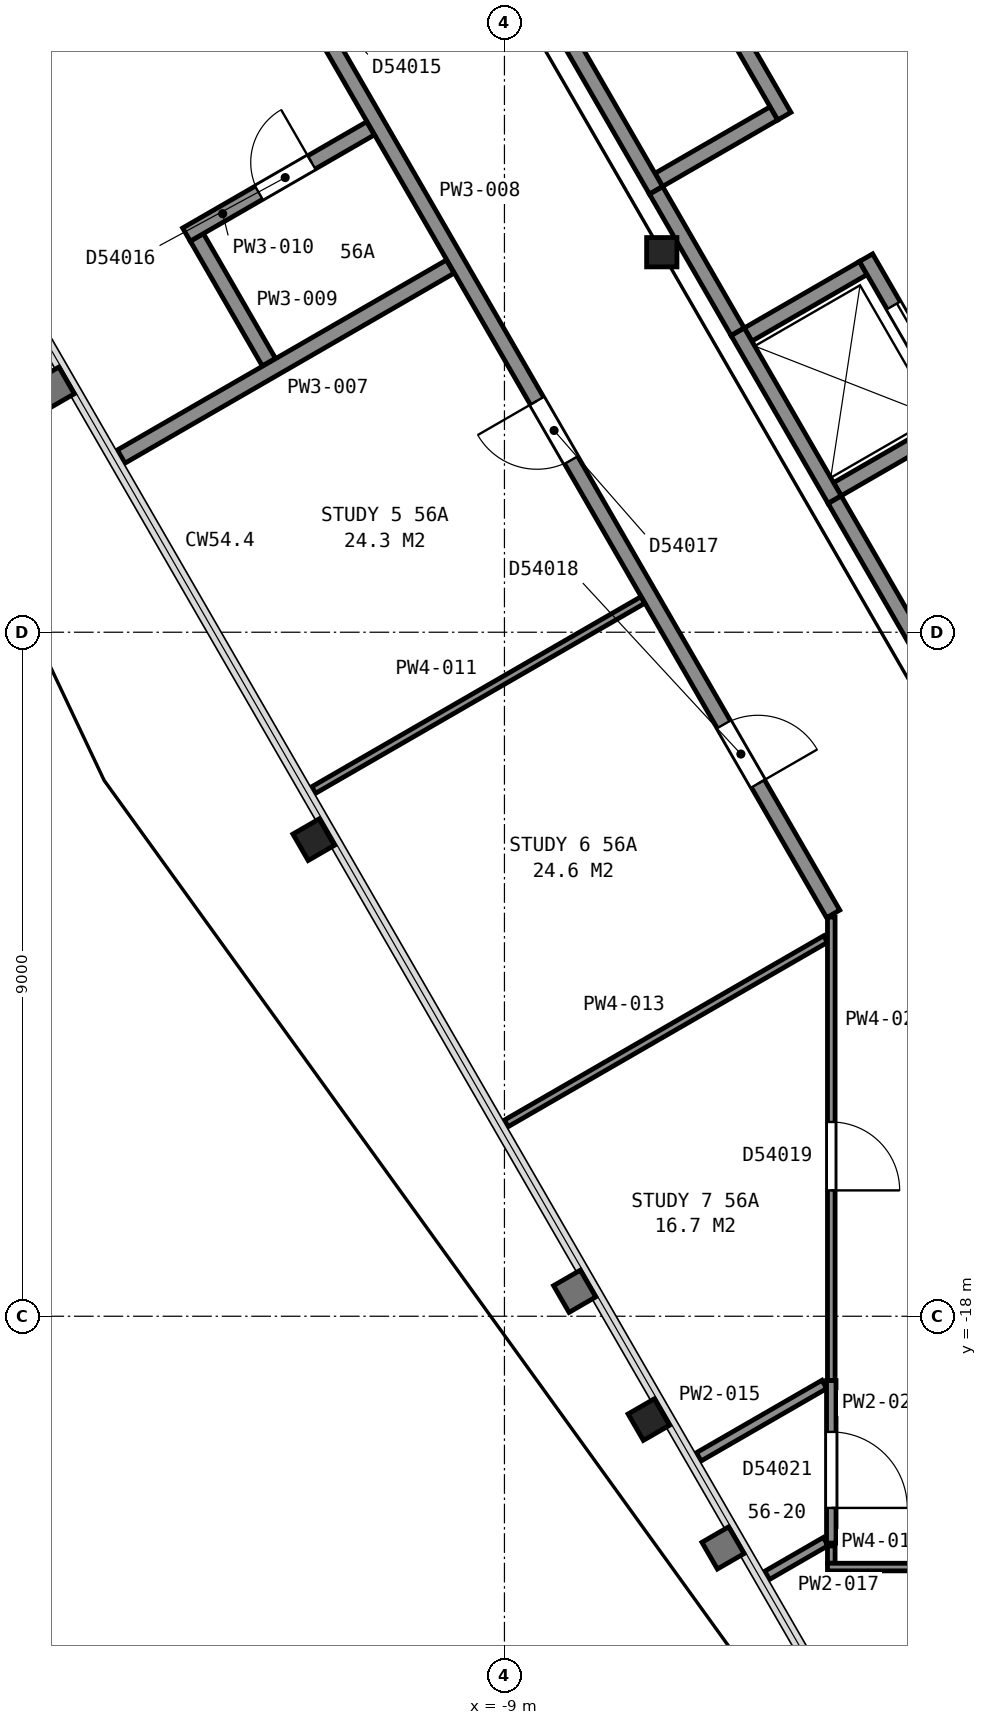
"""IFC4 building model, lengths in metres.
Left out: names, types, materials, properties, quantities, classifications, styles, units other than length and angle.
Written with IfcOpenShell. Run it as: python <this file> out.ifc"""

import sys

from ifc_helpers import new_model, si_unit, direction, frame, frame_2d, origin, origin_2d, place, context, subcontext, project, spatial, rectangle, i_section, extrude, element, fill, save


model = new_model("IFC4")
c1 = context("Model", 3, precision=1e-05, world=origin(), true_north=direction((0.0, 1.0)))
c2 = subcontext(c1, "Body", "Model", "MODEL_VIEW")
j1 = project(units=[si_unit("LENGTHUNIT", "METRE"), si_unit("PLANEANGLEUNIT", "RADIAN")], contexts=[c1])
p1 = place(None, origin())
s1 = spatial("IfcSite", under=j1, at=p1, CompositionType="ELEMENT")
p2 = place(p1, origin())
s2 = spatial("IfcBuilding", under=s1, at=p2, CompositionType="ELEMENT")
p3 = place(p2, frame((0.0, 0.0, 224.9)))
s3 = spatial("IfcBuildingStorey", under=s2, at=p3, CompositionType="ELEMENT", Elevation=224.9)
for number, where, z_axis, x_axis in (
    (1, (-11.51, -11.73, 0.0), (0.0, 0.0, 1.0), (-0.5, 0.866, 0.0)),
    (2, (-7.1, -19.36, 0.0), (0.0, 0.0, 1.0), (-0.5, 0.866, 0.0)),
):
    element("IfcColumn", number, at=place(p3, frame(where, z_axis=z_axis, x_axis=x_axis)), inside=s3, PredefinedType="COLUMN", context=c2, shape_type="SweptSolid", body=[
        extrude(i_section(OverallWidth=0.401, OverallDepth=0.399, WebThickness=0.025, FlangeThickness=0.04, FilletRadius=0.015, at=origin_2d()), origin(), (0.0, 0.0, 1.0), 3.7),
    ])
p4 = place(p3, frame((-6.93, -4.0, 0.0), z_axis=(0.0, 0.0, 1.0), x_axis=(1.0, 0.0, 0.0)))
e3 = element("IfcColumn", 3, at=p4, inside=s3, PredefinedType="COLUMN", context=c2, shape_type="SweptSolid", body=[
    extrude(i_section(OverallWidth=0.399, OverallDepth=0.386, WebThickness=0.021, FlangeThickness=0.033, FilletRadius=0.015, at=origin_2d()), origin(), (0.0, 0.0, 1.0), 3.7),
])
for number, where, z_axis, x_axis in (
    (4, (-4.62, -7.118, 0.0), (0.0, 0.0, 1.0), (0.866, 0.5, 0.0)),
    (5, (-5.795, -5.083, 0.0), (0.0, 0.0, 1.0), (0.866, 0.5, 0.0)),
    (6, (-6.97, -3.048, 0.0), (0.0, 0.0, 1.0), (0.866, 0.5, 0.0)),
):
    element("IfcWall", number, at=place(p3, frame(where, z_axis=z_axis, x_axis=x_axis)), inside=s3, PredefinedType="PARTITIONING", context=c2, shape_type="SweptSolid", body=[
        extrude(rectangle(XDim=1.75, YDim=0.2, at=frame_2d((0.875, 0.0))), origin(), (0.0, 0.0, 1.0), 3.7),
    ])
p5 = place(p3, frame((-2.968, -6.28, 0.0), z_axis=(0.0, 0.0, 1.0), x_axis=(-0.499990435942, 0.866030925526, 0.0)))
e7 = element("IfcWall", 7, at=p5, inside=s3, PredefinedType="PARTITIONING", context=c2, shape_type="SweptSolid", body=[
    extrude(rectangle(XDim=2.55, YDim=0.2, at=frame_2d((1.275, 0.0))), origin(), (0.0, 0.0, 1.0), 3.7),
])
p6 = place(p5, frame((0.725, 0.0, 0.0)))
e8 = element("IfcOpeningElement", 8, at=p6, cuts=e7, PredefinedType="OPENING", context=c2, shape_type="SweptSolid", body=[
    extrude(rectangle(XDim=1.1, YDim=2.1, at=frame_2d((0.55, 1.05))), frame((0.0, 0.11, 0.0), z_axis=(0.0, -1.0, 0.0), x_axis=(1.0, 0.0, 0.0)), (0.0, 0.0, 1.0), 0.22),
])
p7 = place(p3, frame((-5.318, -2.21, 0.0), z_axis=(0.0, 0.0, 1.0), x_axis=(-0.499938297808, 0.866061024631, 0.0)))
e9 = element("IfcWall", 9, at=p7, inside=s3, PredefinedType="PARTITIONING", context=c2, shape_type="SweptSolid", body=[
    extrude(rectangle(XDim=2.35, YDim=0.2, at=frame_2d((1.175, 0.0))), origin(), (0.0, 0.0, 1.0), 3.7),
])
for number, where, z_axis, x_axis in (
    (10, (-4.656, -7.255, 0.0), (0.0, 0.0, 1.0), (-0.5, 0.866, 0.0)),
    (11, (-7.006, -3.185, 0.0), (0.0, 0.0, 1.0), (-0.5, 0.866, 0.0)),
):
    element("IfcWall", number, at=place(p3, frame(where, z_axis=z_axis, x_axis=x_axis)), inside=s3, PredefinedType="PARTITIONING", context=c2, shape_type="SweptSolid", body=[
        extrude(rectangle(XDim=2.55, YDim=0.2, at=frame_2d((1.275, 0.0))), origin(), (0.0, 0.0, 1.0), 3.7),
    ])
p8 = place(p3, frame((-7.005, -3.187, 0.0), z_axis=(0.0, 0.0, 1.0), x_axis=(0.499689606989, -0.866204535123, 0.0)))
e12 = element("IfcWall", 12, at=p8, inside=s3, PredefinedType="PARTITIONING", context=c2, shape_type="SweptSolid", body=[
    extrude(rectangle(XDim=2.145, YDim=0.2, at=frame_2d((1.072, 0.0))), origin(), (0.0, 0.0, 1.0), 3.45),
])
p9 = place(p3, frame((-4.655, -7.257, 0.0), z_axis=(0.0, 0.0, 1.0), x_axis=(0.499966124405, -0.866044960985, 0.0)))
e13 = element("IfcWall", 13, at=p9, inside=s3, PredefinedType="PARTITIONING", context=c2, shape_type="SweptSolid", body=[
    extrude(rectangle(XDim=5.956, YDim=0.2, at=frame_2d((2.978, 0.0))), origin(), (0.0, 0.0, 1.0), 3.45),
])
p10 = place(p3, frame((-14.043, -6.689, 0.0), z_axis=(0.0, 0.0, 1.0), x_axis=(0.866053039883, 0.499952129818, 0.0)))
e14 = element("IfcWall", 14, at=p10, inside=s3, PredefinedType="PARTITIONING", context=c2, shape_type="SweptSolid", body=[
    extrude(rectangle(XDim=5.0, YDim=0.2, at=frame_2d((2.5, 0.0))), origin(), (0.0, 0.0, 1.0), 2.713),
])
p11 = place(p3, frame((-4.675, -12.706, 0.0), z_axis=(0.0, 0.0, 1.0), x_axis=(-0.49997440863, 0.866040178465, 0.0)))
e15 = element("IfcWall", 15, at=p11, inside=s3, PredefinedType="PARTITIONING", context=c2, shape_type="SweptSolid", body=[
    extrude(rectangle(XDim=17.335, YDim=0.2, at=frame_2d((8.667, 0.0))), origin(), (0.0, 0.0, 1.0), 2.713),
])
p12 = place(p11, frame((14.185, 0.0, 0.0)))
e16 = element("IfcOpeningElement", 16, at=p12, cuts=e15, PredefinedType="OPENING", context=c2, shape_type="SweptSolid", body=[
    extrude(rectangle(XDim=0.9, YDim=2.1, at=frame_2d((0.45, 1.05))), frame((0.0, 0.11, 0.0), z_axis=(0.0, -1.0, 0.0), x_axis=(1.0, 0.0, 0.0)), (0.0, 0.0, 1.0), 0.22),
])
p13 = place(p11, frame((6.895, 0.0, 0.0)))
e17 = element("IfcOpeningElement", 17, at=p13, cuts=e15, PredefinedType="OPENING", context=c2, shape_type="SweptSolid", body=[
    extrude(rectangle(XDim=0.9, YDim=2.1, at=frame_2d((0.45, 1.05))), frame((0.0, 0.11, 0.0), z_axis=(0.0, -1.0, 0.0), x_axis=(1.0, 0.0, 0.0)), (0.0, 0.0, 1.0), 0.22),
])
p14 = place(p11, frame((1.979, 0.0, 0.0)))
e18 = element("IfcOpeningElement", 18, at=p14, cuts=e15, PredefinedType="OPENING", context=c2, shape_type="SweptSolid", body=[
    extrude(rectangle(XDim=0.9, YDim=2.1, at=frame_2d((0.45, 1.05))), frame((0.0, 0.11, 0.0), z_axis=(0.0, -1.0, 0.0), x_axis=(1.0, 0.0, 0.0)), (0.0, 0.0, 1.0), 0.22),
])
p15 = place(p3, frame((-13.047, -3.805, 0.0), z_axis=(0.0, 0.0, 1.0), x_axis=(0.499949193323, -0.866054735046, 0.0)))
e19 = element("IfcWall", 19, at=p15, inside=s3, PredefinedType="PARTITIONING", context=c2, shape_type="SweptSolid", body=[
    extrude(rectangle(XDim=1.895, YDim=0.2, at=frame_2d((0.948, 0.0))), origin(), (0.0, 0.0, 1.0), 2.713),
])
p16 = place(p3, frame((-10.763, -2.371, 0.0), z_axis=(0.0, 0.0, 1.0), x_axis=(-0.866041588165, -0.499971966783, 0.0)))
e20 = element("IfcWall", 20, at=p16, inside=s3, PredefinedType="PARTITIONING", context=c2, shape_type="SweptSolid", body=[
    extrude(rectangle(XDim=2.795, YDim=0.2, at=frame_2d((1.397, 0.0))), origin(), (0.0, 0.0, 1.0), 2.713),
])
p17 = place(p16, frame((0.895, 0.0, 0.0)))
e21 = element("IfcOpeningElement", 21, at=p17, cuts=e20, PredefinedType="OPENING", context=c2, shape_type="SweptSolid", body=[
    extrude(rectangle(XDim=0.8, YDim=2.1, at=frame_2d((0.4, 1.05))), frame((0.0, 0.11, 0.0), z_axis=(0.0, -1.0, 0.0), x_axis=(1.0, 0.0, 0.0)), (0.0, 0.0, 1.0), 0.22),
])
p18 = place(p3, frame((-11.51, -11.076, 0.0), z_axis=(0.0, 0.0, 1.0), x_axis=(0.866053039883, 0.499952129818, 0.0)))
e22 = element("IfcWall", 22, at=p18, inside=s3, PredefinedType="PARTITIONING", context=c2, shape_type="SweptSolid", body=[
    extrude(rectangle(XDim=5.0, YDim=0.1, at=frame_2d((2.5, 0.0))), origin(), (0.0, 0.0, 1.0), 2.713),
])
p19 = place(p3, frame((-8.977, -15.463, 0.0), z_axis=(0.0, 0.0, 1.0), x_axis=(0.866042300147, 0.4999707335, 0.0)))
e23 = element("IfcWall", 23, at=p19, inside=s3, PredefinedType="PARTITIONING", context=c2, shape_type="SweptSolid", body=[
    extrude(rectangle(XDim=4.852, YDim=0.1, at=frame_2d((2.426, 0.0))), origin(), (0.0, 0.0, 1.0), 2.713),
])
p20 = place(p3, frame((-6.444, -19.85, 0.0), z_axis=(0.0, 0.0, 1.0), x_axis=(0.866172805685, 0.499744605466, 0.0)))
e24 = element("IfcWall", 24, at=p20, inside=s3, PredefinedType="PARTITIONING", context=c2, shape_type="SweptSolid", body=[
    extrude(rectangle(XDim=1.908, YDim=0.125, at=frame_2d((0.954, 0.0))), origin(), (0.0, 0.0, 1.0), 2.713),
])
p21 = place(p3, frame((-5.544, -21.409, 0.0), z_axis=(0.0, 0.0, 1.0), x_axis=(0.866089597041, 0.499888797531, 0.0)))
e25 = element("IfcWall", 25, at=p21, inside=s3, PredefinedType="PARTITIONING", context=c2, shape_type="SweptSolid", body=[
    extrude(rectangle(XDim=0.889, YDim=0.125, at=frame_2d((0.445, 0.0))), origin(), (0.0, 0.0, 1.0), 2.713),
])
p22 = place(p3, frame((-4.7, -21.25, 0.0), z_axis=(0.0, 0.0, 1.0), x_axis=(0.0, 1.0, 0.0)))
e26 = element("IfcWall", 26, at=p22, inside=s3, PredefinedType="PARTITIONING", context=c2, shape_type="SweptSolid", body=[
    extrude(rectangle(XDim=0.228, YDim=0.1, at=frame_2d((0.114, 0.0))), origin(), (0.0, 0.0, 1.0), 2.713),
])
p23 = place(p3, frame((4.75, -21.3, 0.0), z_axis=(0.0, 0.0, 1.0), x_axis=(-1.0, 0.0, 0.0)))
e27 = element("IfcWall", 27, at=p23, inside=s3, PredefinedType="PARTITIONING", context=c2, shape_type="SweptSolid", body=[
    extrude(rectangle(XDim=9.5, YDim=0.1, at=frame_2d((4.75, 0.0))), origin(), (0.0, 0.0, 1.0), 2.713),
])
p24 = place(p23, frame((4.15, 0.0, 0.0)))
e28 = element("IfcOpeningElement", 28, at=p24, cuts=e27, PredefinedType="OPENING", context=c2, shape_type="SweptSolid", body=[
    extrude(rectangle(XDim=1.2, YDim=2.1, at=frame_2d((0.6, 1.05))), frame((0.0, 0.06, 0.0), z_axis=(0.0, -1.0, 0.0), x_axis=(1.0, 0.0, 0.0)), (0.0, 0.0, 1.0), 0.12),
])
p25 = place(p3, frame((-4.7, -18.846, 0.0), z_axis=(0.0, 0.0, 1.0), x_axis=(0.0, -1.0, 0.0)))
e29 = element("IfcWall", 29, at=p25, inside=s3, PredefinedType="PARTITIONING", context=c2, shape_type="SweptSolid", body=[
    extrude(rectangle(XDim=2.138, YDim=0.125, at=frame_2d((1.069, 0.0))), origin(), (0.0, 0.0, 1.0), 2.713),
])
p26 = place(p25, frame((0.676, 0.0, 0.0)))
e30 = element("IfcOpeningElement", 30, at=p26, cuts=e29, PredefinedType="OPENING", context=c2, shape_type="SweptSolid", body=[
    extrude(rectangle(XDim=1.0, YDim=2.1, at=frame_2d((0.5, 1.05))), frame((0.0, 0.073, 0.0), z_axis=(0.0, -1.0, 0.0), x_axis=(1.0, 0.0, 0.0)), (0.0, 0.0, 1.0), 0.145),
])
p27 = place(p3, frame((-4.7, -18.844, 0.0), z_axis=(0.0, 0.0, 1.0), x_axis=(0.0, 1.0, 0.0)))
e31 = element("IfcWall", 31, at=p27, inside=s3, PredefinedType="PARTITIONING", context=c2, shape_type="SweptSolid", body=[
    extrude(rectangle(XDim=6.096, YDim=0.1, at=frame_2d((3.048, 0.0))), origin(), (0.0, 0.0, 1.0), 2.713),
])
p28 = place(p27, frame((2.5, 0.0, 0.0)))
e32 = element("IfcOpeningElement", 32, at=p28, cuts=e31, PredefinedType="OPENING", context=c2, shape_type="SweptSolid", body=[
    extrude(rectangle(XDim=0.9, YDim=2.1, at=frame_2d((0.45, 1.05))), frame((0.0, 0.06, 0.0), z_axis=(0.0, -1.0, 0.0), x_axis=(1.0, 0.0, 0.0)), (0.0, 0.0, 1.0), 0.12),
])
p29 = place(p6, origin())
e33 = element("IfcDoor", 33, at=p29, inside=s3, OperationType="SLIDING_TO_RIGHT", PredefinedType="DOOR", context=c2, shape_type="SweptSolid", body=[
    extrude(rectangle(XDim=1.1, YDim=2.1, at=frame_2d((0.55, 1.05))), frame((0.0, 0.025, 0.0), z_axis=(0.0, -1.0, 0.0), x_axis=(1.0, 0.0, 0.0)), (0.0, 0.0, 1.0), 0.05),
])
fill(e8, e33)
p30 = place(p13, origin())
e34 = element("IfcDoor", 34, at=p30, inside=s3, OperationType="SINGLE_SWING_RIGHT", PredefinedType="DOOR", context=c2, shape_type="SweptSolid", body=[
    extrude(rectangle(XDim=0.9, YDim=2.1, at=frame_2d((0.45, 1.05))), frame((0.0, 0.025, 0.0), z_axis=(0.0, -1.0, 0.0), x_axis=(1.0, 0.0, 0.0)), (0.0, 0.0, 1.0), 0.05),
])
fill(e17, e34)
p31 = place(p14, origin())
e35 = element("IfcDoor", 35, at=p31, inside=s3, OperationType="SINGLE_SWING_LEFT", PredefinedType="DOOR", context=c2, shape_type="SweptSolid", body=[
    extrude(rectangle(XDim=0.9, YDim=2.1, at=frame_2d((0.45, 1.05))), frame((0.0, 0.025, 0.0), z_axis=(0.0, -1.0, 0.0), x_axis=(1.0, 0.0, 0.0)), (0.0, 0.0, 1.0), 0.05),
])
fill(e18, e35)
p32 = place(p17, origin())
e36 = element("IfcDoor", 36, at=p32, inside=s3, OperationType="SINGLE_SWING_LEFT", PredefinedType="DOOR", context=c2, shape_type="SweptSolid", body=[
    extrude(rectangle(XDim=0.8, YDim=2.1, at=frame_2d((0.4, 1.05))), frame((0.0, 0.025, 0.0), z_axis=(0.0, -1.0, 0.0), x_axis=(1.0, 0.0, 0.0)), (0.0, 0.0, 1.0), 0.05),
])
fill(e21, e36)
p33 = place(p26, origin())
e37 = element("IfcDoor", 37, at=p33, inside=s3, OperationType="SINGLE_SWING_RIGHT", PredefinedType="DOOR", context=c2, shape_type="SweptSolid", body=[
    extrude(rectangle(XDim=1.0, YDim=2.1, at=frame_2d((0.5, 1.05))), frame((0.0, 0.025, 0.0), z_axis=(0.0, -1.0, 0.0), x_axis=(1.0, 0.0, 0.0)), (0.0, 0.0, 1.0), 0.05),
])
fill(e30, e37)
p34 = place(p28, origin())
e38 = element("IfcDoor", 38, at=p34, inside=s3, OperationType="SINGLE_SWING_LEFT", PredefinedType="DOOR", context=c2, shape_type="SweptSolid", body=[
    extrude(rectangle(XDim=0.9, YDim=2.1, at=frame_2d((0.45, 1.05))), frame((0.0, 0.025, 0.0), z_axis=(0.0, -1.0, 0.0), x_axis=(1.0, 0.0, 0.0)), (0.0, 0.0, 1.0), 0.05),
])
fill(e32, e38)
save(model, sys.argv[1])
